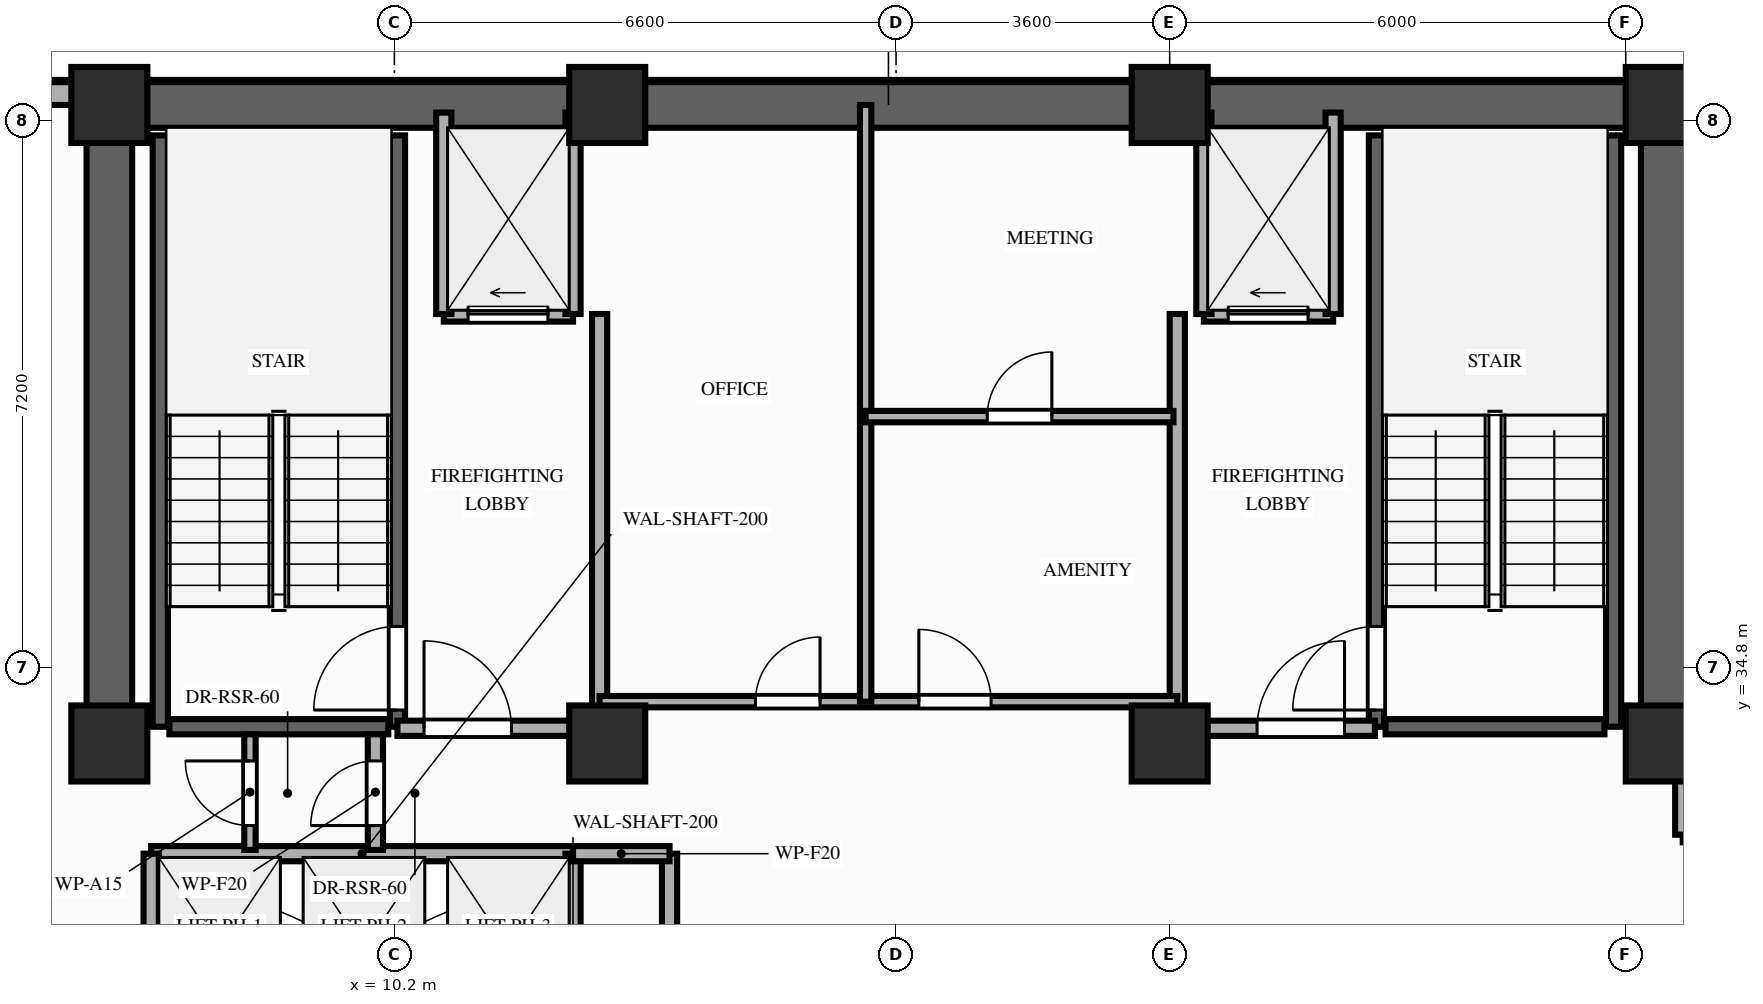
"""IFC4 building model, lengths in metres.
Left out: names, types, materials, properties, quantities, classifications, styles, units other than length and angle.
Written with IfcOpenShell. Run it as: python <this file> out.ifc"""

import sys

from ifc_helpers import new_model, si_unit, direction, frame, frame_2d, origin, origin_2d, place, context, subcontext, project, spatial, rectangle, extrude, element, fill, save


model = new_model("IFC4")
c1 = context("Model", 3, precision=1e-05, world=origin(), true_north=direction((0.0, 1.0)))
c2 = subcontext(c1, "Body", "Model", "MODEL_VIEW")
j1 = project(units=[si_unit("LENGTHUNIT", "METRE"), si_unit("PLANEANGLEUNIT", "RADIAN")], contexts=[c1])
p1 = place(None, origin())
s1 = spatial("IfcSite", under=j1, at=p1, CompositionType="ELEMENT")
p2 = place(p1, origin())
s2 = spatial("IfcBuilding", under=s1, at=p2, CompositionType="ELEMENT")
p3 = place(p2, frame((0.0, 0.0, 182.4)))
s3 = spatial("IfcBuildingStorey", under=s2, at=p3, CompositionType="ELEMENT", Elevation=182.4)
for number, where, z_axis, x_axis in (
    (1, (6.45, 33.8, 0.0), (0.0, 0.0, 1.0), (1.0, 0.0, 0.0)),
    (2, (13.0, 33.8, 0.0), (0.0, 0.0, 1.0), (1.0, 0.0, 0.0)),
    (3, (20.4, 33.8, 0.0), (0.0, 0.0, 1.0), (1.0, 0.0, 0.0)),
    (4, (26.9, 33.8, 0.0), (0.0, 0.0, 1.0), (1.0, 0.0, 0.0)),
    (5, (6.45, 42.2, 0.0), (0.0, 0.0, 1.0), (1.0, 0.0, 0.0)),
    (6, (13.0, 42.2, 0.0), (0.0, 0.0, 1.0), (1.0, 0.0, 0.0)),
    (7, (20.4, 42.2, 0.0), (0.0, 0.0, 1.0), (1.0, 0.0, 0.0)),
    (8, (26.9, 42.2, 0.0), (0.0, 0.0, 1.0), (1.0, 0.0, 0.0)),
):
    element("IfcColumn", number, at=place(p3, frame(where, z_axis=z_axis, x_axis=x_axis)), inside=s3, PredefinedType="COLUMN", context=c2, shape_type="SweptSolid", body=[
        extrude(rectangle(XDim=1.0, YDim=1.0, at=origin_2d()), origin(), (0.0, 0.0, 1.0), 3.2),
    ])
p4 = place(p3, frame((6.0, 42.35, 0.0), z_axis=(0.0, 0.0, 1.0), x_axis=(-1.0, 0.0, 0.0)))
e9 = element("IfcWall", 9, at=p4, inside=s3, PredefinedType="STANDARD", context=c2, shape_type="SweptSolid", body=[
    extrude(rectangle(XDim=2.0, YDim=0.3, at=frame_2d((1.0, 0.0))), origin(), (0.0, 0.0, 1.0), 3.02),
])
p5 = place(p3, frame((6.45, 42.2, 0.0), z_axis=(0.0, 0.0, 1.0), x_axis=(1.0, 0.0, 0.0)))
e10 = element("IfcWall", 10, at=p5, inside=s3, PredefinedType="SHEAR", context=c2, shape_type="SweptSolid", body=[
    extrude(rectangle(XDim=20.45, YDim=0.6, at=frame_2d((10.225, 0.0))), origin(), (0.0, 0.0, 1.0), 3.02),
])
for number, where, z_axis, x_axis in (
    (11, (6.45, 33.8, 0.0), (0.0, 0.0, 1.0), (0.0, 1.0, 0.0)),
    (12, (26.9, 33.8, 0.0), (0.0, 0.0, 1.0), (0.0, 1.0, 0.0)),
):
    element("IfcWall", number, at=place(p3, frame(where, z_axis=z_axis, x_axis=x_axis)), inside=s3, PredefinedType="SHEAR", context=c2, shape_type="SweptSolid", body=[
        extrude(rectangle(XDim=7.95, YDim=0.6, at=frame_2d((3.975, 0.0))), origin(), (0.0, 0.0, 1.0), 3.02),
    ])
p6 = place(p3, frame((7.12, 34.02, 0.0), z_axis=(0.0, 0.0, 1.0), x_axis=(0.0, 1.0, 0.0)))
e13 = element("IfcWall", 13, at=p6, inside=s3, PredefinedType="SHEAR", context=c2, shape_type="SweptSolid", body=[
    extrude(rectangle(XDim=7.78, YDim=0.2, at=frame_2d((3.89, 0.0))), origin(), (0.0, 0.0, 1.0), 3.02),
])
p7 = place(p3, frame((10.24, 34.02, 0.0), z_axis=(0.0, 0.0, 1.0), x_axis=(0.0, 1.0, 0.0)))
e14 = element("IfcWall", 14, at=p7, inside=s3, PredefinedType="SHEAR", context=c2, shape_type="SweptSolid", body=[
    extrude(rectangle(XDim=7.78, YDim=0.2, at=frame_2d((3.89, 0.0))), origin(), (0.0, 0.0, 1.0), 3.02),
])
p8 = place(p7, frame((0.22, 0.0, 0.0)))
e15 = element("IfcOpeningElement", 15, at=p8, cuts=e14, PredefinedType="OPENING", context=c2, shape_type="SweptSolid", body=[
    extrude(rectangle(XDim=1.1, YDim=2.15, at=frame_2d((0.55, 1.075))), frame((0.0, 0.11, 0.0), z_axis=(0.0, -1.0, 0.0), x_axis=(1.0, 0.0, 0.0)), (0.0, 0.0, 1.0), 0.22),
])
p9 = place(p3, frame((7.24, 34.02, 0.0), z_axis=(0.0, 0.0, 1.0), x_axis=(1.0, 0.0, 0.0)))
e16 = element("IfcWall", 16, at=p9, inside=s3, PredefinedType="SHEAR", context=c2, shape_type="SweptSolid", body=[
    extrude(rectangle(XDim=2.88, YDim=0.2, at=frame_2d((1.44, 0.0))), origin(), (0.0, 0.0, 1.0), 3.02),
])
p10 = place(p3, frame((23.12, 34.02, 0.0), z_axis=(0.0, 0.0, 1.0), x_axis=(0.0, 1.0, 0.0)))
e17 = element("IfcWall", 17, at=p10, inside=s3, PredefinedType="SHEAR", context=c2, shape_type="SweptSolid", body=[
    extrude(rectangle(XDim=7.78, YDim=0.2, at=frame_2d((3.89, 0.0))), origin(), (0.0, 0.0, 1.0), 3.02),
])
p11 = place(p10, frame((0.22, 0.0, 0.0)))
e18 = element("IfcOpeningElement", 18, at=p11, cuts=e17, PredefinedType="OPENING", context=c2, shape_type="SweptSolid", body=[
    extrude(rectangle(XDim=1.1, YDim=2.15, at=frame_2d((0.55, 1.075))), frame((0.0, 0.11, 0.0), z_axis=(0.0, -1.0, 0.0), x_axis=(1.0, 0.0, 0.0)), (0.0, 0.0, 1.0), 0.22),
])
p12 = place(p3, frame((26.24, 34.02, 0.0), z_axis=(0.0, 0.0, 1.0), x_axis=(0.0, 1.0, 0.0)))
e19 = element("IfcWall", 19, at=p12, inside=s3, PredefinedType="SHEAR", context=c2, shape_type="SweptSolid", body=[
    extrude(rectangle(XDim=7.78, YDim=0.2, at=frame_2d((3.89, 0.0))), origin(), (0.0, 0.0, 1.0), 3.02),
])
p13 = place(p3, frame((23.24, 34.02, 0.0), z_axis=(0.0, 0.0, 1.0), x_axis=(1.0, 0.0, 0.0)))
e20 = element("IfcWall", 20, at=p13, inside=s3, PredefinedType="SHEAR", context=c2, shape_type="SweptSolid", body=[
    extrude(rectangle(XDim=2.88, YDim=0.2, at=frame_2d((1.44, 0.0))), origin(), (0.0, 0.0, 1.0), 3.02),
])
p14 = place(p3, frame((7.0, 32.35, 0.0), z_axis=(0.0, 0.0, 1.0), x_axis=(1.0, 0.0, 0.0)))
e21 = element("IfcWall", 21, at=p14, inside=s3, PredefinedType="MOVABLE", context=c2, shape_type="SweptSolid", body=[
    extrude(rectangle(XDim=5.55, YDim=0.2, at=frame_2d((2.775, 0.0))), origin(), (0.0, 0.0, 1.0), 3.02),
])
for number, where, z_axis, x_axis in (
    (22, (7.0, 29.85, 0.0), (0.0, 0.0, 1.0), (0.0, 1.0, 0.0)),
    (23, (12.55, 29.85, 0.0), (0.0, 0.0, 1.0), (0.0, 1.0, 0.0)),
):
    element("IfcWall", number, at=place(p3, frame(where, z_axis=z_axis, x_axis=x_axis)), inside=s3, PredefinedType="MOVABLE", context=c2, shape_type="SweptSolid", body=[
        extrude(rectangle(XDim=2.5, YDim=0.2, at=frame_2d((1.25, 0.0))), origin(), (0.0, 0.0, 1.0), 3.02),
    ])
p15 = place(p3, frame((10.85, 39.45, 0.0), z_axis=(0.0, 0.0, 1.0), x_axis=(1.0, 0.0, 0.0)))
e24 = element("IfcWall", 24, at=p15, inside=s3, PredefinedType="MOVABLE", context=c2, shape_type="SweptSolid", body=[
    extrude(rectangle(XDim=1.7, YDim=0.2, at=frame_2d((0.85, 0.0))), origin(), (0.0, 0.0, 1.0), 3.02),
])
p16 = place(p15, frame((0.32, 0.0, 0.0)))
e25 = element("IfcOpeningElement", 25, at=p16, cuts=e24, PredefinedType="OPENING", context=c2, shape_type="SweptSolid", body=[
    extrude(rectangle(XDim=1.05, YDim=2.15, at=frame_2d((0.525, 1.075))), frame((0.0, 0.11, 0.0), z_axis=(0.0, -1.0, 0.0), x_axis=(1.0, 0.0, 0.0)), (0.0, 0.0, 1.0), 0.22),
])
p17 = place(p3, frame((20.85, 39.45, 0.0), z_axis=(0.0, 0.0, 1.0), x_axis=(1.0, 0.0, 0.0)))
e26 = element("IfcWall", 26, at=p17, inside=s3, PredefinedType="MOVABLE", context=c2, shape_type="SweptSolid", body=[
    extrude(rectangle(XDim=1.7, YDim=0.2, at=frame_2d((0.85, 0.0))), origin(), (0.0, 0.0, 1.0), 3.02),
])
p18 = place(p17, frame((0.32, 0.0, 0.0)))
e27 = element("IfcOpeningElement", 27, at=p18, cuts=e26, PredefinedType="OPENING", context=c2, shape_type="SweptSolid", body=[
    extrude(rectangle(XDim=1.05, YDim=2.15, at=frame_2d((0.525, 1.075))), frame((0.0, 0.11, 0.0), z_axis=(0.0, -1.0, 0.0), x_axis=(1.0, 0.0, 0.0)), (0.0, 0.0, 1.0), 0.22),
])
for number, where, z_axis, x_axis in (
    (28, (10.85, 39.45, 0.0), (0.0, 0.0, 1.0), (0.0, 1.0, 0.0)),
    (29, (12.55, 39.45, 0.0), (0.0, 0.0, 1.0), (0.0, 1.0, 0.0)),
):
    element("IfcWall", number, at=place(p3, frame(where, z_axis=z_axis, x_axis=x_axis)), inside=s3, PredefinedType="MOVABLE", context=c2, shape_type="SweptSolid", body=[
        extrude(rectangle(XDim=2.65, YDim=0.2, at=frame_2d((1.325, 0.0))), origin(), (0.0, 0.0, 1.0), 2.45),
    ])
p19 = place(p3, frame((12.9, 34.0, 0.0), z_axis=(0.0, 0.0, 1.0), x_axis=(0.0, 1.0, 0.0)))
e30 = element("IfcWall", 30, at=p19, inside=s3, PredefinedType="PARTITIONING", context=c2, shape_type="SweptSolid", body=[
    extrude(rectangle(XDim=5.45, YDim=0.2, at=frame_2d((2.725, 0.0))), origin(), (0.0, 0.0, 1.0), 2.45),
])
p20 = place(p3, frame((10.24, 34.0, 0.0), z_axis=(0.0, 0.0, 1.0), x_axis=(1.0, 0.0, 0.0)))
e31 = element("IfcWall", 31, at=p20, inside=s3, PredefinedType="PARTITIONING", context=c2, shape_type="SweptSolid", body=[
    extrude(rectangle(XDim=2.66, YDim=0.2, at=frame_2d((1.33, 0.0))), origin(), (0.0, 0.0, 1.0), 2.45),
])
p21 = place(p20, frame((0.35, 0.0, 0.0)))
e32 = element("IfcOpeningElement", 32, at=p21, cuts=e31, PredefinedType="OPENING", context=c2, shape_type="SweptSolid", body=[
    extrude(rectangle(XDim=1.15, YDim=2.15, at=frame_2d((0.575, 1.075))), frame((0.0, 0.11, 0.0), z_axis=(0.0, -1.0, 0.0), x_axis=(1.0, 0.0, 0.0)), (0.0, 0.0, 1.0), 0.22),
])
for number, where, z_axis, x_axis in (
    (33, (20.85, 39.45, 0.0), (0.0, 0.0, 1.0), (0.0, 1.0, 0.0)),
    (34, (22.55, 39.45, 0.0), (0.0, 0.0, 1.0), (0.0, 1.0, 0.0)),
):
    element("IfcWall", number, at=place(p3, frame(where, z_axis=z_axis, x_axis=x_axis)), inside=s3, PredefinedType="MOVABLE", context=c2, shape_type="SweptSolid", body=[
        extrude(rectangle(XDim=2.65, YDim=0.2, at=frame_2d((1.325, 0.0))), origin(), (0.0, 0.0, 1.0), 2.45),
    ])
p22 = place(p3, frame((20.5, 34.0, 0.0), z_axis=(0.0, 0.0, 1.0), x_axis=(0.0, 1.0, 0.0)))
e35 = element("IfcWall", 35, at=p22, inside=s3, PredefinedType="PARTITIONING", context=c2, shape_type="SweptSolid", body=[
    extrude(rectangle(XDim=5.45, YDim=0.2, at=frame_2d((2.725, 0.0))), origin(), (0.0, 0.0, 1.0), 2.45),
])
p23 = place(p3, frame((20.5, 34.0, 0.0), z_axis=(0.0, 0.0, 1.0), x_axis=(1.0, 0.0, 0.0)))
e36 = element("IfcWall", 36, at=p23, inside=s3, PredefinedType="PARTITIONING", context=c2, shape_type="SweptSolid", body=[
    extrude(rectangle(XDim=2.6, YDim=0.2, at=frame_2d((1.3, 0.0))), origin(), (0.0, 0.0, 1.0), 2.45),
])
p24 = place(p23, frame((1.05, 0.0, 0.0)))
e37 = element("IfcOpeningElement", 37, at=p24, cuts=e36, PredefinedType="OPENING", context=c2, shape_type="SweptSolid", body=[
    extrude(rectangle(XDim=1.15, YDim=2.15, at=frame_2d((0.575, 1.075))), frame((0.0, 0.11, 0.0), z_axis=(0.0, -1.0, 0.0), x_axis=(1.0, 0.0, 0.0)), (0.0, 0.0, 1.0), 0.22),
])
p25 = place(p3, frame((9.95, 32.4, 0.0), z_axis=(0.0, 0.0, 1.0), x_axis=(0.0, 1.0, 0.0)))
e38 = element("IfcWall", 38, at=p25, inside=s3, PredefinedType="PARTITIONING", context=c2, shape_type="SweptSolid", body=[
    extrude(rectangle(XDim=1.52, YDim=0.2, at=frame_2d((0.76, 0.0))), origin(), (0.0, 0.0, 1.0), 2.45),
])
p26 = place(p25, frame((0.32, 0.0, 0.0)))
e39 = element("IfcOpeningElement", 39, at=p26, cuts=e38, PredefinedType="OPENING", context=c2, shape_type="SweptSolid", body=[
    extrude(rectangle(XDim=0.85, YDim=2.05, at=frame_2d((0.425, 1.025))), frame((0.0, 0.11, 0.0), z_axis=(0.0, -1.0, 0.0), x_axis=(1.0, 0.0, 0.0)), (0.0, 0.0, 1.0), 0.22),
])
p27 = place(p3, frame((8.3, 32.4, 0.0), z_axis=(0.0, 0.0, 1.0), x_axis=(0.0, 1.0, 0.0)))
e40 = element("IfcWall", 40, at=p27, inside=s3, PredefinedType="PARTITIONING", context=c2, shape_type="SweptSolid", body=[
    extrude(rectangle(XDim=1.52, YDim=0.15, at=frame_2d((0.76, 0.0))), origin(), (0.0, 0.0, 1.0), 2.45),
])
p28 = place(p27, frame((0.32, 0.0, 0.0)))
e41 = element("IfcOpeningElement", 41, at=p28, cuts=e40, PredefinedType="OPENING", context=c2, shape_type="SweptSolid", body=[
    extrude(rectangle(XDim=0.85, YDim=2.05, at=frame_2d((0.425, 1.025))), frame((0.0, 0.085, 0.0), z_axis=(0.0, -1.0, 0.0), x_axis=(1.0, 0.0, 0.0)), (0.0, 0.0, 1.0), 0.17),
])
p29 = place(p3, frame((13.82, 29.85, 0.0), z_axis=(0.0, 0.0, 1.0), x_axis=(0.0, 1.0, 0.0)))
e42 = element("IfcWall", 42, at=p29, inside=s3, PredefinedType="PARTITIONING", context=c2, shape_type="SweptSolid", body=[
    extrude(rectangle(XDim=2.5, YDim=0.2, at=frame_2d((1.25, 0.0))), origin(), (0.0, 0.0, 1.0), 3.02),
])
p30 = place(p3, frame((12.55, 32.35, 0.0), z_axis=(0.0, 0.0, 1.0), x_axis=(1.0, 0.0, 0.0)))
e43 = element("IfcWall", 43, at=p30, inside=s3, PredefinedType="PARTITIONING", context=c2, shape_type="SweptSolid", body=[
    extrude(rectangle(XDim=1.27, YDim=0.2, at=frame_2d((0.635, 0.0))), origin(), (0.0, 0.0, 1.0), 3.02),
])
p31 = place(p3, frame((12.9, 34.35, 0.0), z_axis=(0.0, 0.0, 1.0), x_axis=(1.0, 0.0, 0.0)))
e44 = element("IfcWall", 44, at=p31, inside=s3, PredefinedType="PARTITIONING", context=c2, shape_type="SweptSolid", body=[
    extrude(rectangle(XDim=7.6, YDim=0.15, at=frame_2d((3.8, 0.0))), origin(), (0.0, 0.0, 1.0), 3.02),
])
p32 = place(p31, frame((2.05, 0.0, 0.0)))
e45 = element("IfcOpeningElement", 45, at=p32, cuts=e44, PredefinedType="OPENING", context=c2, shape_type="SweptSolid", body=[
    extrude(rectangle(XDim=0.85, YDim=2.05, at=frame_2d((0.425, 1.025))), frame((0.0, 0.085, 0.0), z_axis=(0.0, -1.0, 0.0), x_axis=(1.0, 0.0, 0.0)), (0.0, 0.0, 1.0), 0.17),
])
p33 = place(p31, frame((4.2, 0.0, 0.0)))
e46 = element("IfcOpeningElement", 46, at=p33, cuts=e44, PredefinedType="OPENING", context=c2, shape_type="SweptSolid", body=[
    extrude(rectangle(XDim=0.95, YDim=2.15, at=frame_2d((0.475, 1.075))), frame((0.0, 0.085, 0.0), z_axis=(0.0, -1.0, 0.0), x_axis=(1.0, 0.0, 0.0)), (0.0, 0.0, 1.0), 0.17),
])
p34 = place(p3, frame((16.4, 34.35, 0.0), z_axis=(0.0, 0.0, 1.0), x_axis=(0.0, 1.0, 0.0)))
e47 = element("IfcWall", 47, at=p34, inside=s3, PredefinedType="PARTITIONING", context=c2, shape_type="SweptSolid", body=[
    extrude(rectangle(XDim=7.85, YDim=0.15, at=frame_2d((3.925, 0.0))), origin(), (0.0, 0.0, 1.0), 2.45),
])
p35 = place(p3, frame((16.4, 38.1, 0.0), z_axis=(0.0, 0.0, 1.0), x_axis=(1.0, 0.0, 0.0)))
e48 = element("IfcWall", 48, at=p35, inside=s3, PredefinedType="PARTITIONING", context=c2, shape_type="SweptSolid", body=[
    extrude(rectangle(XDim=4.05, YDim=0.15, at=frame_2d((2.025, 0.0))), origin(), (0.0, 0.0, 1.0), 3.02),
])
p36 = place(p35, frame((1.6, 0.0, 0.0)))
e49 = element("IfcOpeningElement", 49, at=p36, cuts=e48, PredefinedType="OPENING", context=c2, shape_type="SweptSolid", body=[
    extrude(rectangle(XDim=0.85, YDim=2.05, at=frame_2d((0.425, 1.025))), frame((0.0, 0.085, 0.0), z_axis=(0.0, -1.0, 0.0), x_axis=(1.0, 0.0, 0.0)), (0.0, 0.0, 1.0), 0.17),
])
p37 = place(p3, frame((27.15, 32.6, 0.0), z_axis=(0.0, 0.0, 1.0), x_axis=(1.0, 0.0, 0.0)))
e50 = element("IfcWall", 50, at=p37, inside=s3, PredefinedType="PARTITIONING", context=c2, shape_type="SweptSolid", body=[
    extrude(rectangle(XDim=10.85, YDim=0.2, at=frame_2d((5.425, 0.0))), origin(), (0.0, 0.0, 1.0), 2.45),
])
p38 = place(p37, frame((1.53, 0.0, 0.0)))
e51 = element("IfcOpeningElement", 51, at=p38, cuts=e50, PredefinedType="OPENING", context=c2, shape_type="SweptSolid", body=[
    extrude(rectangle(XDim=0.95, YDim=2.15, at=frame_2d((0.475, 1.075))), frame((0.0, 0.11, 0.0), z_axis=(0.0, -1.0, 0.0), x_axis=(1.0, 0.0, 0.0)), (0.0, 0.0, 1.0), 0.22),
])
p39 = place(p37, frame((6.95, 0.0, 0.0)))
e52 = element("IfcOpeningElement", 52, at=p39, cuts=e50, PredefinedType="OPENING", context=c2, shape_type="SweptSolid", body=[
    extrude(rectangle(XDim=0.95, YDim=2.15, at=frame_2d((0.475, 1.075))), frame((0.0, 0.11, 0.0), z_axis=(0.0, -1.0, 0.0), x_axis=(1.0, 0.0, 0.0)), (0.0, 0.0, 1.0), 0.22),
])
p40 = place(p3, frame((27.15, 32.6, 0.0), z_axis=(0.0, 0.0, 1.0), x_axis=(0.0, 1.0, 0.0)))
e53 = element("IfcWall", 53, at=p40, inside=s3, PredefinedType="PARTITIONING", context=c2, shape_type="SweptSolid", body=[
    extrude(rectangle(XDim=1.08, YDim=0.2, at=frame_2d((0.54, 0.0))), origin(), (0.0, 0.0, 1.0), 2.45),
])
p41 = place(p8, origin())
e54 = element("IfcDoor", 54, at=p41, inside=s3, OperationType="SINGLE_SWING_LEFT", PredefinedType="DOOR", context=c2, shape_type="SweptSolid", body=[
    extrude(rectangle(XDim=1.1, YDim=2.15, at=frame_2d((0.55, 1.075))), frame((0.0, 0.025, 0.0), z_axis=(0.0, -1.0, 0.0), x_axis=(1.0, 0.0, 0.0)), (0.0, 0.0, 1.0), 0.05),
])
fill(e15, e54)
p42 = place(p11, origin())
e55 = element("IfcDoor", 55, at=p42, inside=s3, OperationType="SINGLE_SWING_LEFT", PredefinedType="DOOR", context=c2, shape_type="SweptSolid", body=[
    extrude(rectangle(XDim=1.1, YDim=2.15, at=frame_2d((0.55, 1.075))), frame((0.0, 0.025, 0.0), z_axis=(0.0, -1.0, 0.0), x_axis=(1.0, 0.0, 0.0)), (0.0, 0.0, 1.0), 0.05),
])
fill(e18, e55)
p43 = place(p16, origin())
e56 = element("IfcDoor", 56, at=p43, inside=s3, OperationType="SLIDING_TO_LEFT", PredefinedType="DOOR", context=c2, shape_type="SweptSolid", body=[
    extrude(rectangle(XDim=1.05, YDim=2.15, at=frame_2d((0.525, 1.075))), frame((0.0, 0.025, 0.0), z_axis=(0.0, -1.0, 0.0), x_axis=(1.0, 0.0, 0.0)), (0.0, 0.0, 1.0), 0.05),
])
fill(e25, e56)
p44 = place(p18, origin())
e57 = element("IfcDoor", 57, at=p44, inside=s3, OperationType="SLIDING_TO_LEFT", PredefinedType="DOOR", context=c2, shape_type="SweptSolid", body=[
    extrude(rectangle(XDim=1.05, YDim=2.15, at=frame_2d((0.525, 1.075))), frame((0.0, 0.025, 0.0), z_axis=(0.0, -1.0, 0.0), x_axis=(1.0, 0.0, 0.0)), (0.0, 0.0, 1.0), 0.05),
])
fill(e27, e57)
p45 = place(p21, origin())
e58 = element("IfcDoor", 58, at=p45, inside=s3, OperationType="SINGLE_SWING_LEFT", PredefinedType="DOOR", context=c2, shape_type="SweptSolid", body=[
    extrude(rectangle(XDim=1.15, YDim=2.15, at=frame_2d((0.575, 1.075))), frame((0.0, 0.025, 0.0), z_axis=(0.0, -1.0, 0.0), x_axis=(1.0, 0.0, 0.0)), (0.0, 0.0, 1.0), 0.05),
])
fill(e32, e58)
p46 = place(p24, origin())
e59 = element("IfcDoor", 59, at=p46, inside=s3, OperationType="SINGLE_SWING_RIGHT", PredefinedType="DOOR", context=c2, shape_type="SweptSolid", body=[
    extrude(rectangle(XDim=1.15, YDim=2.15, at=frame_2d((0.575, 1.075))), frame((0.0, 0.025, 0.0), z_axis=(0.0, -1.0, 0.0), x_axis=(1.0, 0.0, 0.0)), (0.0, 0.0, 1.0), 0.05),
])
fill(e37, e59)
p47 = place(p26, origin())
e60 = element("IfcDoor", 60, at=p47, inside=s3, OperationType="SINGLE_SWING_LEFT", PredefinedType="DOOR", context=c2, shape_type="SweptSolid", body=[
    extrude(rectangle(XDim=0.85, YDim=2.05, at=frame_2d((0.425, 1.025))), frame((0.0, 0.025, 0.0), z_axis=(0.0, -1.0, 0.0), x_axis=(1.0, 0.0, 0.0)), (0.0, 0.0, 1.0), 0.05),
])
fill(e39, e60)
p48 = place(p28, origin())
e61 = element("IfcDoor", 61, at=p48, inside=s3, OperationType="SINGLE_SWING_RIGHT", PredefinedType="DOOR", context=c2, shape_type="SweptSolid", body=[
    extrude(rectangle(XDim=0.85, YDim=2.05, at=frame_2d((0.425, 1.025))), frame((0.0, 0.025, 0.0), z_axis=(0.0, -1.0, 0.0), x_axis=(1.0, 0.0, 0.0)), (0.0, 0.0, 1.0), 0.05),
])
fill(e41, e61)
p49 = place(p32, origin())
e62 = element("IfcDoor", 62, at=p49, inside=s3, OperationType="SINGLE_SWING_RIGHT", PredefinedType="DOOR", context=c2, shape_type="SweptSolid", body=[
    extrude(rectangle(XDim=0.85, YDim=2.05, at=frame_2d((0.425, 1.025))), frame((0.0, 0.025, 0.0), z_axis=(0.0, -1.0, 0.0), x_axis=(1.0, 0.0, 0.0)), (0.0, 0.0, 1.0), 0.05),
])
fill(e45, e62)
p50 = place(p33, origin())
e63 = element("IfcDoor", 63, at=p50, inside=s3, OperationType="SINGLE_SWING_LEFT", PredefinedType="DOOR", context=c2, shape_type="SweptSolid", body=[
    extrude(rectangle(XDim=0.95, YDim=2.15, at=frame_2d((0.475, 1.075))), frame((0.0, 0.025, 0.0), z_axis=(0.0, -1.0, 0.0), x_axis=(1.0, 0.0, 0.0)), (0.0, 0.0, 1.0), 0.05),
])
fill(e46, e63)
p51 = place(p36, origin())
e64 = element("IfcDoor", 64, at=p51, inside=s3, OperationType="SINGLE_SWING_RIGHT", PredefinedType="DOOR", context=c2, shape_type="SweptSolid", body=[
    extrude(rectangle(XDim=0.85, YDim=2.05, at=frame_2d((0.425, 1.025))), frame((0.0, 0.025, 0.0), z_axis=(0.0, -1.0, 0.0), x_axis=(1.0, 0.0, 0.0)), (0.0, 0.0, 1.0), 0.05),
])
fill(e49, e64)
save(model, sys.argv[1])
